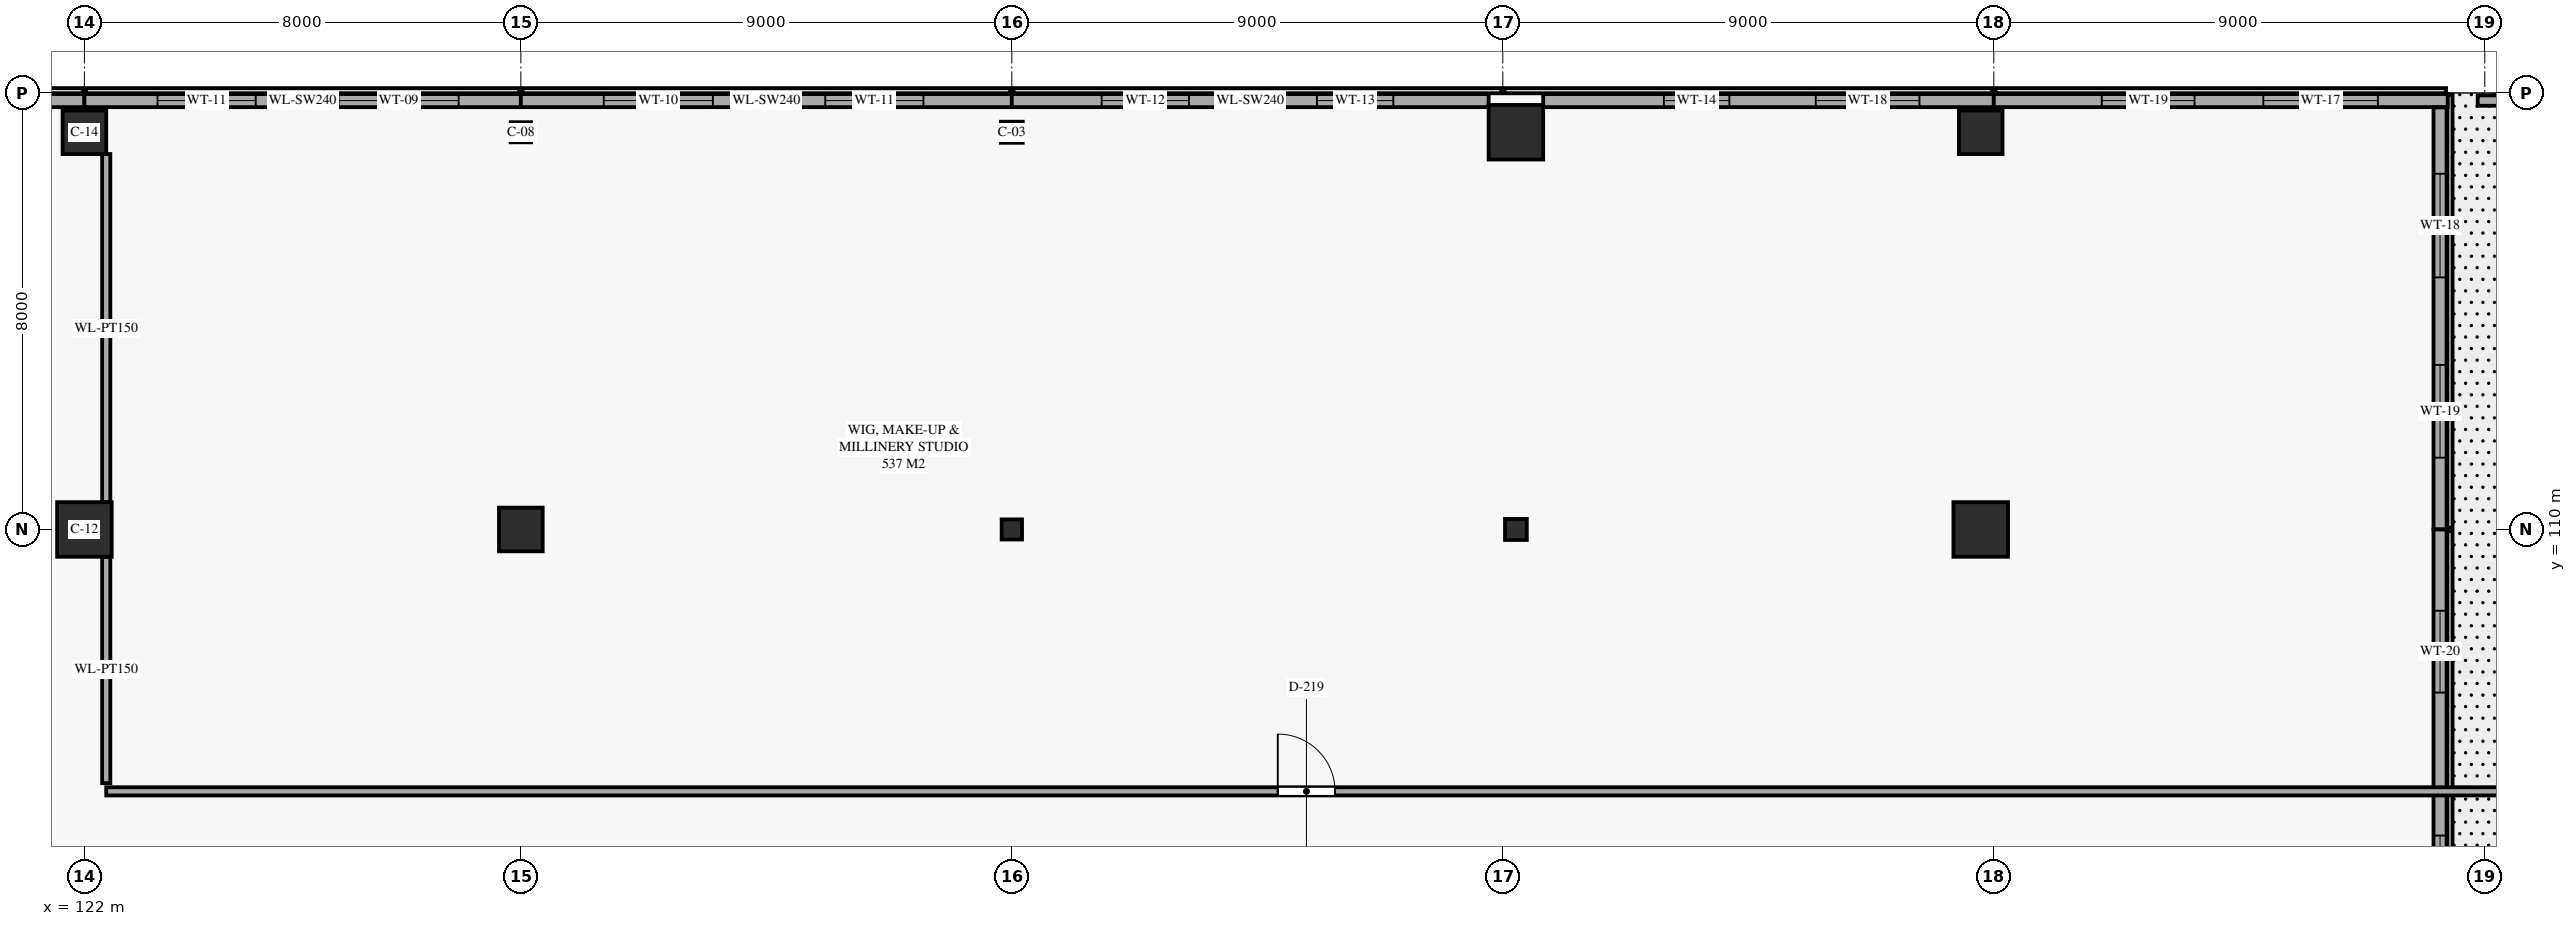
"""IFC4 building model, lengths in metres.
Left out: names, types, materials, properties, quantities, classifications, styles, units other than length and angle.
Written with IfcOpenShell. Run it as: python <this file> out.ifc"""

import sys

from ifc_helpers import new_model, si_unit, direction, frame, frame_2d, origin, origin_2d, place, context, subcontext, project, spatial, rectangle, i_section, extrude, element, fill, save


model = new_model("IFC4")
c1 = context("Model", 3, precision=1e-05, world=origin(), true_north=direction((0.0, 1.0)))
c2 = subcontext(c1, "Body", "Model", "MODEL_VIEW")
j1 = project(units=[si_unit("LENGTHUNIT", "METRE"), si_unit("PLANEANGLEUNIT", "RADIAN")], contexts=[c1])
p1 = place(None, origin())
s1 = spatial("IfcSite", under=j1, at=p1, CompositionType="ELEMENT")
p2 = place(p1, origin())
s2 = spatial("IfcBuilding", under=s1, at=p2, CompositionType="ELEMENT")
p3 = place(p2, frame((0.0, 0.0, 10.0)))
s3 = spatial("IfcBuildingStorey", under=s2, at=p3, CompositionType="ELEMENT", Elevation=10.0)
p4 = place(p3, frame((122.0, 110.0, 0.0), z_axis=(0.0, 0.0, 1.0), x_axis=(1.0, 0.0, 0.0)))
e1 = element("IfcColumn", 1, at=p4, inside=s3, PredefinedType="COLUMN", context=c2, shape_type="SweptSolid", body=[
    extrude(rectangle(XDim=1.0, YDim=1.0, at=origin_2d()), origin(), (0.0, 0.0, 1.0), 4.71),
])
for number, where, z_axis, x_axis in (
    (2, (122.0, 117.28, 0.0), (0.0, 0.0, 1.0), (1.0, 0.0, 0.0)),
    (3, (130.0, 110.0, 0.0), (0.0, 0.0, 1.0), (1.0, 0.0, 0.0)),
):
    element("IfcColumn", number, at=place(p3, frame(where, z_axis=z_axis, x_axis=x_axis)), inside=s3, PredefinedType="COLUMN", context=c2, shape_type="SweptSolid", body=[
        extrude(rectangle(XDim=0.8, YDim=0.8, at=origin_2d()), origin(), (0.0, 0.0, 1.0), 4.71),
    ])
for number, where, z_axis, x_axis in (
    (4, (130.0, 117.28, 0.0), (0.0, 0.0, 1.0), (1.0, 0.0, 0.0)),
    (5, (139.0, 110.0, 0.0), (0.0, 0.0, 1.0), (1.0, 0.0, 0.0)),
):
    element("IfcColumn", number, at=place(p3, frame(where, z_axis=z_axis, x_axis=x_axis)), inside=s3, PredefinedType="COLUMN", context=c2, shape_type="SweptSolid", body=[
        extrude(i_section(OverallWidth=0.373, OverallDepth=0.368, WebThickness=0.015, FlangeThickness=0.024, FilletRadius=0.015, at=origin_2d()), origin(), (0.0, 0.0, 1.0), 4.71),
    ])
for number, where, z_axis, x_axis in (
    (6, (139.0, 117.28, 0.0), (0.0, 0.0, 1.0), (1.0, 0.0, 0.0)),
    (7, (148.24, 110.0, 0.0), (0.0, 0.0, 1.0), (1.0, 0.0, 0.0)),
):
    element("IfcColumn", number, at=place(p3, frame(where, z_axis=z_axis, x_axis=x_axis)), inside=s3, PredefinedType="COLUMN", context=c2, shape_type="SweptSolid", body=[
        extrude(i_section(OverallWidth=0.399, OverallDepth=0.386, WebThickness=0.021, FlangeThickness=0.033, FilletRadius=0.016, at=origin_2d()), origin(), (0.0, 0.0, 1.0), 4.71),
    ])
for number, where, z_axis, x_axis in (
    (8, (148.24, 117.28, 0.0), (0.0, 0.0, 1.0), (1.0, 0.0, 0.0)),
    (9, (156.76, 110.0, 0.0), (0.0, 0.0, 1.0), (1.0, 0.0, 0.0)),
):
    element("IfcColumn", number, at=place(p3, frame(where, z_axis=z_axis, x_axis=x_axis)), inside=s3, PredefinedType="COLUMN", context=c2, shape_type="SweptSolid", body=[
        extrude(rectangle(XDim=1.0, YDim=1.0, at=origin_2d()), origin(), (0.0, 0.0, 1.0), 4.71),
    ])
p5 = place(p3, frame((156.76, 117.28, 0.0), z_axis=(0.0, 0.0, 1.0), x_axis=(1.0, 0.0, 0.0)))
e10 = element("IfcColumn", 10, at=p5, inside=s3, PredefinedType="COLUMN", context=c2, shape_type="SweptSolid", body=[
    extrude(rectangle(XDim=0.8, YDim=0.8, at=origin_2d()), origin(), (0.0, 0.0, 1.0), 4.71),
])
p6 = place(p3, frame((114.68, 117.86, 0.0), z_axis=(0.0, 0.0, 1.0), x_axis=(1.0, 0.0, 0.0)))
e11 = element("IfcWall", 11, at=p6, inside=s3, PredefinedType="SOLIDWALL", context=c2, shape_type="SweptSolid", body=[
    extrude(rectangle(XDim=7.32, YDim=0.24, at=frame_2d((3.66, 0.0))), origin(), (0.0, 0.0, 1.0), 4.675),
])
p7 = place(p6, frame((1.35, 0.0, 0.65)))
e12 = element("IfcOpeningElement", 12, at=p7, cuts=e11, PredefinedType="OPENING", context=c2, shape_type="SweptSolid", body=[
    extrude(rectangle(XDim=1.4, YDim=2.3, at=frame_2d((0.7, 1.15))), frame((0.0, 0.13, 0.0), z_axis=(0.0, -1.0, 0.0), x_axis=(1.0, 0.0, 0.0)), (0.0, 0.0, 1.0), 0.26),
])
p8 = place(p6, frame((4.67, 0.0, 0.65)))
e13 = element("IfcOpeningElement", 13, at=p8, cuts=e11, PredefinedType="OPENING", context=c2, shape_type="SweptSolid", body=[
    extrude(rectangle(XDim=1.2, YDim=2.3, at=frame_2d((0.6, 1.15))), frame((0.0, 0.13, 0.0), z_axis=(0.0, -1.0, 0.0), x_axis=(1.0, 0.0, 0.0)), (0.0, 0.0, 1.0), 0.26),
])
p9 = place(p3, frame((122.0, 117.86, 0.0), z_axis=(0.0, 0.0, 1.0), x_axis=(1.0, 0.0, 0.0)))
e14 = element("IfcWall", 14, at=p9, inside=s3, PredefinedType="SOLIDWALL", context=c2, shape_type="SweptSolid", body=[
    extrude(rectangle(XDim=8.0, YDim=0.24, at=frame_2d((4.0, 0.0))), origin(), (0.0, 0.0, 1.0), 4.71),
])
p10 = place(p9, frame((1.34, 0.0, 0.65)))
e15 = element("IfcOpeningElement", 15, at=p10, cuts=e14, PredefinedType="OPENING", context=c2, shape_type="SweptSolid", body=[
    extrude(rectangle(XDim=1.8, YDim=2.05, at=frame_2d((0.9, 1.025))), frame((0.0, 0.13, 0.0), z_axis=(0.0, -1.0, 0.0), x_axis=(1.0, 0.0, 0.0)), (0.0, 0.0, 1.0), 0.26),
])
p11 = place(p9, frame((4.66, 0.0, 0.65)))
e16 = element("IfcOpeningElement", 16, at=p11, cuts=e14, PredefinedType="OPENING", context=c2, shape_type="SweptSolid", body=[
    extrude(rectangle(XDim=2.2, YDim=2.05, at=frame_2d((1.1, 1.025))), frame((0.0, 0.13, 0.0), z_axis=(0.0, -1.0, 0.0), x_axis=(1.0, 0.0, 0.0)), (0.0, 0.0, 1.0), 0.26),
])
p12 = place(p3, frame((130.0, 117.86, 0.0), z_axis=(0.0, 0.0, 1.0), x_axis=(1.0, 0.0, 0.0)))
e17 = element("IfcWall", 17, at=p12, inside=s3, PredefinedType="SOLIDWALL", context=c2, shape_type="SweptSolid", body=[
    extrude(rectangle(XDim=9.0, YDim=0.24, at=frame_2d((4.5, 0.0))), origin(), (0.0, 0.0, 1.0), 4.71),
])
p13 = place(p12, frame((1.52, 0.0, 0.65)))
e18 = element("IfcOpeningElement", 18, at=p13, cuts=e17, PredefinedType="OPENING", context=c2, shape_type="SweptSolid", body=[
    extrude(rectangle(XDim=2.0, YDim=2.05, at=frame_2d((1.0, 1.025))), frame((0.0, 0.13, 0.0), z_axis=(0.0, -1.0, 0.0), x_axis=(1.0, 0.0, 0.0)), (0.0, 0.0, 1.0), 0.26),
])
p14 = place(p12, frame((5.58, 0.0, 0.65)))
e19 = element("IfcOpeningElement", 19, at=p14, cuts=e17, PredefinedType="OPENING", context=c2, shape_type="SweptSolid", body=[
    extrude(rectangle(XDim=1.8, YDim=2.05, at=frame_2d((0.9, 1.025))), frame((0.0, 0.13, 0.0), z_axis=(0.0, -1.0, 0.0), x_axis=(1.0, 0.0, 0.0)), (0.0, 0.0, 1.0), 0.26),
])
p15 = place(p3, frame((139.0, 117.86, 0.0), z_axis=(0.0, 0.0, 1.0), x_axis=(1.0, 0.0, 0.0)))
e20 = element("IfcWall", 20, at=p15, inside=s3, PredefinedType="SOLIDWALL", context=c2, shape_type="SweptSolid", body=[
    extrude(rectangle(XDim=8.74, YDim=0.24, at=frame_2d((4.37, 0.0))), origin(), (0.0, 0.0, 1.0), 4.71),
])
p16 = place(p15, frame((1.647, 0.0, 0.65)))
e21 = element("IfcOpeningElement", 21, at=p16, cuts=e20, PredefinedType="OPENING", context=c2, shape_type="SweptSolid", body=[
    extrude(rectangle(XDim=1.6, YDim=2.05, at=frame_2d((0.8, 1.025))), frame((0.0, 0.13, 0.0), z_axis=(0.0, -1.0, 0.0), x_axis=(1.0, 0.0, 0.0)), (0.0, 0.0, 1.0), 0.26),
])
p17 = place(p15, frame((5.593, 0.0, 0.65)))
e22 = element("IfcOpeningElement", 22, at=p17, cuts=e20, PredefinedType="OPENING", context=c2, shape_type="SweptSolid", body=[
    extrude(rectangle(XDim=1.4, YDim=2.05, at=frame_2d((0.7, 1.025))), frame((0.0, 0.13, 0.0), z_axis=(0.0, -1.0, 0.0), x_axis=(1.0, 0.0, 0.0)), (0.0, 0.0, 1.0), 0.26),
])
p18 = place(p3, frame((148.74, 117.86, 0.0), z_axis=(0.0, 0.0, 1.0), x_axis=(1.0, 0.0, 0.0)))
e23 = element("IfcWall", 23, at=p18, inside=s3, PredefinedType="SOLIDWALL", context=c2, shape_type="SweptSolid", body=[
    extrude(rectangle(XDim=8.26, YDim=0.24, at=frame_2d((4.13, 0.0))), origin(), (0.0, 0.0, 1.0), 4.71),
])
p19 = place(p18, frame((2.213, 0.0, 0.65)))
e24 = element("IfcOpeningElement", 24, at=p19, cuts=e23, PredefinedType="OPENING", context=c2, shape_type="SweptSolid", body=[
    extrude(rectangle(XDim=1.2, YDim=2.05, at=frame_2d((0.6, 1.025))), frame((0.0, 0.13, 0.0), z_axis=(0.0, -1.0, 0.0), x_axis=(1.0, 0.0, 0.0)), (0.0, 0.0, 1.0), 0.26),
])
p20 = place(p18, frame((4.997, 0.0, 0.8)))
e25 = element("IfcOpeningElement", 25, at=p20, cuts=e23, PredefinedType="OPENING", context=c2, shape_type="SweptSolid", body=[
    extrude(rectangle(XDim=1.9, YDim=1.8, at=frame_2d((0.95, 0.9))), frame((0.0, 0.13, 0.0), z_axis=(0.0, -1.0, 0.0), x_axis=(1.0, 0.0, 0.0)), (0.0, 0.0, 1.0), 0.26),
])
p21 = place(p3, frame((157.0, 117.86, 0.0), z_axis=(0.0, 0.0, 1.0), x_axis=(1.0, 0.0, 0.0)))
e26 = element("IfcWall", 26, at=p21, inside=s3, PredefinedType="SOLIDWALL", context=c2, shape_type="SweptSolid", body=[
    extrude(rectangle(XDim=8.32, YDim=0.24, at=frame_2d((4.16, 0.0))), origin(), (0.0, 0.0, 1.0), 4.71),
])
p22 = place(p21, frame((1.979, 0.0, 0.8)))
e27 = element("IfcOpeningElement", 27, at=p22, cuts=e26, PredefinedType="OPENING", context=c2, shape_type="SweptSolid", body=[
    extrude(rectangle(XDim=1.7, YDim=1.8, at=frame_2d((0.85, 0.9))), frame((0.0, 0.13, 0.0), z_axis=(0.0, -1.0, 0.0), x_axis=(1.0, 0.0, 0.0)), (0.0, 0.0, 1.0), 0.26),
])
p23 = place(p21, frame((4.94, 0.0, 0.8)))
e28 = element("IfcOpeningElement", 28, at=p23, cuts=e26, PredefinedType="OPENING", context=c2, shape_type="SweptSolid", body=[
    extrude(rectangle(XDim=2.1, YDim=1.8, at=frame_2d((1.05, 0.9))), frame((0.0, 0.13, 0.0), z_axis=(0.0, -1.0, 0.0), x_axis=(1.0, 0.0, 0.0)), (0.0, 0.0, 1.0), 0.26),
])
p24 = place(p3, frame((165.18, 117.735, 0.0), z_axis=(0.0, 0.0, 1.0), x_axis=(0.0, -1.0, 0.0)))
e29 = element("IfcWall", 29, at=p24, inside=s3, PredefinedType="SOLIDWALL", context=c2, shape_type="SweptSolid", body=[
    extrude(rectangle(XDim=7.735, YDim=0.24, at=frame_2d((3.868, 0.0))), origin(), (0.0, 0.0, 1.0), 4.71),
])
p25 = place(p24, frame((1.216, 0.0, 0.8)))
e30 = element("IfcOpeningElement", 30, at=p25, cuts=e29, PredefinedType="OPENING", context=c2, shape_type="SweptSolid", body=[
    extrude(rectangle(XDim=1.9, YDim=1.8, at=frame_2d((0.95, 0.9))), frame((0.0, 0.13, 0.0), z_axis=(0.0, -1.0, 0.0), x_axis=(1.0, 0.0, 0.0)), (0.0, 0.0, 1.0), 0.26),
])
p26 = place(p24, frame((4.719, 0.0, 0.8)))
e31 = element("IfcOpeningElement", 31, at=p26, cuts=e29, PredefinedType="OPENING", context=c2, shape_type="SweptSolid", body=[
    extrude(rectangle(XDim=1.7, YDim=1.8, at=frame_2d((0.85, 0.9))), frame((0.0, 0.13, 0.0), z_axis=(0.0, -1.0, 0.0), x_axis=(1.0, 0.0, 0.0)), (0.0, 0.0, 1.0), 0.26),
])
p27 = place(p3, frame((165.18, 110.0, 0.0), z_axis=(0.0, 0.0, 1.0), x_axis=(0.0, -1.0, 0.0)))
e32 = element("IfcWall", 32, at=p27, inside=s3, PredefinedType="SOLIDWALL", context=c2, shape_type="SweptSolid", body=[
    extrude(rectangle(XDim=8.0, YDim=0.24, at=frame_2d((4.0, 0.0))), origin(), (0.0, 0.0, 1.0), 4.71),
])
p28 = place(p27, frame((1.49, 0.0, 0.8)))
e33 = element("IfcOpeningElement", 33, at=p28, cuts=e32, PredefinedType="OPENING", context=c2, shape_type="SweptSolid", body=[
    extrude(rectangle(XDim=1.5, YDim=1.8, at=frame_2d((0.75, 0.9))), frame((0.0, 0.13, 0.0), z_axis=(0.0, -1.0, 0.0), x_axis=(1.0, 0.0, 0.0)), (0.0, 0.0, 1.0), 0.26),
])
p29 = place(p27, frame((5.61, 0.0, 0.8)))
e34 = element("IfcOpeningElement", 34, at=p29, cuts=e32, PredefinedType="OPENING", context=c2, shape_type="SweptSolid", body=[
    extrude(rectangle(XDim=1.3, YDim=1.8, at=frame_2d((0.65, 0.9))), frame((0.0, 0.13, 0.0), z_axis=(0.0, -1.0, 0.0), x_axis=(1.0, 0.0, 0.0)), (0.0, 0.0, 1.0), 0.26),
])
p30 = place(p3, frame((165.87, 117.86, 0.0), z_axis=(0.0, 0.0, 1.0), x_axis=(1.0, 0.0, 0.0)))
e35 = element("IfcWall", 35, at=p30, inside=s3, PredefinedType="PARAPET", context=c2, shape_type="SweptSolid", body=[
    extrude(rectangle(XDim=7.99, YDim=0.19, at=frame_2d((3.995, 0.0))), origin(), (0.0, 0.0, 1.0), 0.95),
])
p31 = place(p3, frame((122.4, 105.2, 0.0), z_axis=(0.0, 0.0, 1.0), x_axis=(1.0, 0.0, 0.0)))
e36 = element("IfcWall", 36, at=p31, inside=s3, PredefinedType="PARTITIONING", context=c2, shape_type="SweptSolid", body=[
    extrude(rectangle(XDim=44.0, YDim=0.15, at=frame_2d((22.0, 0.0))), origin(), (0.0, 0.0, 1.0), 4.71),
])
p32 = place(p31, frame((21.475, 0.0, 0.0)))
e37 = element("IfcOpeningElement", 37, at=p32, cuts=e36, PredefinedType="OPENING", context=c2, shape_type="SweptSolid", body=[
    extrude(rectangle(XDim=1.05, YDim=2.2, at=frame_2d((0.525, 1.1))), frame((0.0, 0.085, 0.0), z_axis=(0.0, -1.0, 0.0), x_axis=(1.0, 0.0, 0.0)), (0.0, 0.0, 1.0), 0.17),
])
p33 = place(p3, frame((122.4, 116.88, 0.0), z_axis=(0.0, 0.0, 1.0), x_axis=(0.0, -1.0, 0.0)))
e38 = element("IfcWall", 38, at=p33, inside=s3, PredefinedType="PARTITIONING", context=c2, shape_type="SweptSolid", body=[
    extrude(rectangle(XDim=6.38, YDim=0.15, at=frame_2d((3.19, 0.0))), origin(), (0.0, 0.0, 1.0), 4.71),
])
p34 = place(p3, frame((122.4, 109.5, 0.0), z_axis=(0.0, 0.0, 1.0), x_axis=(0.0, -1.0, 0.0)))
e39 = element("IfcWall", 39, at=p34, inside=s3, PredefinedType="PARTITIONING", context=c2, shape_type="SweptSolid", body=[
    extrude(rectangle(XDim=4.15, YDim=0.15, at=frame_2d((2.075, 0.0))), origin(), (0.0, 0.0, 1.0), 4.71),
])
p35 = place(p10, origin())
e40 = element("IfcWindow", 40, at=p35, inside=s3, PartitioningType="SINGLE_PANEL", PredefinedType="WINDOW", context=c2, shape_type="SweptSolid", body=[
    extrude(rectangle(XDim=1.8, YDim=2.05, at=frame_2d((0.9, 1.025))), frame((0.0, 0.03, 0.0), z_axis=(0.0, -1.0, 0.0), x_axis=(1.0, 0.0, 0.0)), (0.0, 0.0, 1.0), 0.06),
])
fill(e15, e40)
p36 = place(p11, origin())
e41 = element("IfcWindow", 41, at=p36, inside=s3, PartitioningType="SINGLE_PANEL", PredefinedType="WINDOW", context=c2, shape_type="SweptSolid", body=[
    extrude(rectangle(XDim=2.2, YDim=2.05, at=frame_2d((1.1, 1.025))), frame((0.0, 0.03, 0.0), z_axis=(0.0, -1.0, 0.0), x_axis=(1.0, 0.0, 0.0)), (0.0, 0.0, 1.0), 0.06),
])
fill(e16, e41)
p37 = place(p13, origin())
e42 = element("IfcWindow", 42, at=p37, inside=s3, PartitioningType="SINGLE_PANEL", PredefinedType="WINDOW", context=c2, shape_type="SweptSolid", body=[
    extrude(rectangle(XDim=2.0, YDim=2.05, at=frame_2d((1.0, 1.025))), frame((0.0, 0.03, 0.0), z_axis=(0.0, -1.0, 0.0), x_axis=(1.0, 0.0, 0.0)), (0.0, 0.0, 1.0), 0.06),
])
fill(e18, e42)
p38 = place(p14, origin())
e43 = element("IfcWindow", 43, at=p38, inside=s3, PartitioningType="SINGLE_PANEL", PredefinedType="WINDOW", context=c2, shape_type="SweptSolid", body=[
    extrude(rectangle(XDim=1.8, YDim=2.05, at=frame_2d((0.9, 1.025))), frame((0.0, 0.03, 0.0), z_axis=(0.0, -1.0, 0.0), x_axis=(1.0, 0.0, 0.0)), (0.0, 0.0, 1.0), 0.06),
])
fill(e19, e43)
p39 = place(p16, origin())
e44 = element("IfcWindow", 44, at=p39, inside=s3, PartitioningType="SINGLE_PANEL", PredefinedType="WINDOW", context=c2, shape_type="SweptSolid", body=[
    extrude(rectangle(XDim=1.6, YDim=2.05, at=frame_2d((0.8, 1.025))), frame((0.0, 0.03, 0.0), z_axis=(0.0, -1.0, 0.0), x_axis=(1.0, 0.0, 0.0)), (0.0, 0.0, 1.0), 0.06),
])
fill(e21, e44)
p40 = place(p17, origin())
e45 = element("IfcWindow", 45, at=p40, inside=s3, PartitioningType="SINGLE_PANEL", PredefinedType="WINDOW", context=c2, shape_type="SweptSolid", body=[
    extrude(rectangle(XDim=1.4, YDim=2.05, at=frame_2d((0.7, 1.025))), frame((0.0, 0.03, 0.0), z_axis=(0.0, -1.0, 0.0), x_axis=(1.0, 0.0, 0.0)), (0.0, 0.0, 1.0), 0.06),
])
fill(e22, e45)
p41 = place(p19, origin())
e46 = element("IfcWindow", 46, at=p41, inside=s3, PartitioningType="SINGLE_PANEL", PredefinedType="WINDOW", context=c2, shape_type="SweptSolid", body=[
    extrude(rectangle(XDim=1.2, YDim=2.05, at=frame_2d((0.6, 1.025))), frame((0.0, 0.03, 0.0), z_axis=(0.0, -1.0, 0.0), x_axis=(1.0, 0.0, 0.0)), (0.0, 0.0, 1.0), 0.06),
])
fill(e24, e46)
p42 = place(p20, origin())
e47 = element("IfcWindow", 47, at=p42, inside=s3, PartitioningType="SINGLE_PANEL", PredefinedType="WINDOW", context=c2, shape_type="SweptSolid", body=[
    extrude(rectangle(XDim=1.9, YDim=1.8, at=frame_2d((0.95, 0.9))), frame((0.0, 0.03, 0.0), z_axis=(0.0, -1.0, 0.0), x_axis=(1.0, 0.0, 0.0)), (0.0, 0.0, 1.0), 0.06),
])
fill(e25, e47)
p43 = place(p22, origin())
e48 = element("IfcWindow", 48, at=p43, inside=s3, PartitioningType="SINGLE_PANEL", PredefinedType="WINDOW", context=c2, shape_type="SweptSolid", body=[
    extrude(rectangle(XDim=1.7, YDim=1.8, at=frame_2d((0.85, 0.9))), frame((0.0, 0.03, 0.0), z_axis=(0.0, -1.0, 0.0), x_axis=(1.0, 0.0, 0.0)), (0.0, 0.0, 1.0), 0.06),
])
fill(e27, e48)
p44 = place(p23, origin())
e49 = element("IfcWindow", 49, at=p44, inside=s3, PartitioningType="SINGLE_PANEL", PredefinedType="WINDOW", context=c2, shape_type="SweptSolid", body=[
    extrude(rectangle(XDim=2.1, YDim=1.8, at=frame_2d((1.05, 0.9))), frame((0.0, 0.03, 0.0), z_axis=(0.0, -1.0, 0.0), x_axis=(1.0, 0.0, 0.0)), (0.0, 0.0, 1.0), 0.06),
])
fill(e28, e49)
p45 = place(p25, origin())
e50 = element("IfcWindow", 50, at=p45, inside=s3, PartitioningType="SINGLE_PANEL", PredefinedType="WINDOW", context=c2, shape_type="SweptSolid", body=[
    extrude(rectangle(XDim=1.9, YDim=1.8, at=frame_2d((0.95, 0.9))), frame((0.0, 0.03, 0.0), z_axis=(0.0, -1.0, 0.0), x_axis=(1.0, 0.0, 0.0)), (0.0, 0.0, 1.0), 0.06),
])
fill(e30, e50)
p46 = place(p26, origin())
e51 = element("IfcWindow", 51, at=p46, inside=s3, PartitioningType="SINGLE_PANEL", PredefinedType="WINDOW", context=c2, shape_type="SweptSolid", body=[
    extrude(rectangle(XDim=1.7, YDim=1.8, at=frame_2d((0.85, 0.9))), frame((0.0, 0.03, 0.0), z_axis=(0.0, -1.0, 0.0), x_axis=(1.0, 0.0, 0.0)), (0.0, 0.0, 1.0), 0.06),
])
fill(e31, e51)
p47 = place(p28, origin())
e52 = element("IfcWindow", 52, at=p47, inside=s3, PartitioningType="SINGLE_PANEL", PredefinedType="WINDOW", context=c2, shape_type="SweptSolid", body=[
    extrude(rectangle(XDim=1.5, YDim=1.8, at=frame_2d((0.75, 0.9))), frame((0.0, 0.03, 0.0), z_axis=(0.0, -1.0, 0.0), x_axis=(1.0, 0.0, 0.0)), (0.0, 0.0, 1.0), 0.06),
])
fill(e33, e52)
p48 = place(p29, origin())
e53 = element("IfcWindow", 53, at=p48, inside=s3, PartitioningType="SINGLE_PANEL", PredefinedType="WINDOW", context=c2, shape_type="SweptSolid", body=[
    extrude(rectangle(XDim=1.3, YDim=1.8, at=frame_2d((0.65, 0.9))), frame((0.0, 0.03, 0.0), z_axis=(0.0, -1.0, 0.0), x_axis=(1.0, 0.0, 0.0)), (0.0, 0.0, 1.0), 0.06),
])
fill(e34, e53)
p49 = place(p32, origin())
e54 = element("IfcDoor", 54, at=p49, inside=s3, OperationType="SINGLE_SWING_LEFT", PredefinedType="DOOR", context=c2, shape_type="SweptSolid", body=[
    extrude(rectangle(XDim=1.05, YDim=2.2, at=frame_2d((0.525, 1.1))), frame((0.0, 0.025, 0.0), z_axis=(0.0, -1.0, 0.0), x_axis=(1.0, 0.0, 0.0)), (0.0, 0.0, 1.0), 0.05),
])
fill(e37, e54)
save(model, sys.argv[1])
